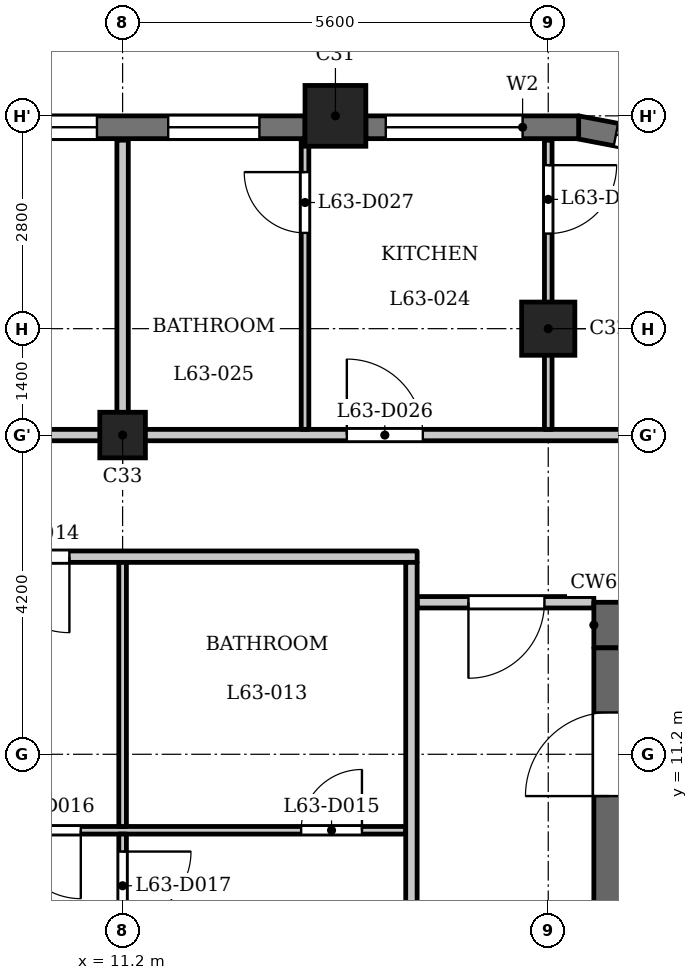
"""IFC4 building model, lengths in metres.
Left out: names, types, materials, properties, quantities, classifications, styles, units other than length and angle.
Written with IfcOpenShell. Run it as: python <this file> out.ifc"""

import sys

from ifc_helpers import new_model, si_unit, direction, frame, frame_2d, origin, origin_2d, place, context, subcontext, project, spatial, rectangle, extrude, element, fill, save


model = new_model("IFC4")
c1 = context("Model", 3, precision=1e-05, world=origin(), true_north=direction((0.0, 1.0)))
c2 = subcontext(c1, "Body", "Model", "MODEL_VIEW")
j1 = project(units=[si_unit("LENGTHUNIT", "METRE"), si_unit("PLANEANGLEUNIT", "RADIAN")], contexts=[c1])
p1 = place(None, origin())
s1 = spatial("IfcSite", under=j1, at=p1, CompositionType="ELEMENT")
p2 = place(p1, origin())
s2 = spatial("IfcBuilding", under=s1, at=p2, CompositionType="ELEMENT")
p3 = place(p2, frame((0.0, 0.0, 245.2)))
s3 = spatial("IfcBuildingStorey", under=s2, at=p3, CompositionType="ELEMENT", Elevation=245.2)
p4 = place(p3, frame((14.0, 19.6, 0.0), z_axis=(0.0, 0.0, 1.0), x_axis=(1.0, 0.0, 0.0)))
e1 = element("IfcColumn", 1, at=p4, inside=s3, PredefinedType="COLUMN", context=c2, shape_type="SweptSolid", body=[
    extrude(rectangle(XDim=0.8, YDim=0.8, at=origin_2d()), origin(), (0.0, 0.0, 1.0), 3.5),
])
p5 = place(p3, frame((16.8, 16.8, 0.0), z_axis=(0.0, 0.0, 1.0), x_axis=(1.0, 0.0, 0.0)))
e2 = element("IfcColumn", 2, at=p5, inside=s3, PredefinedType="COLUMN", context=c2, shape_type="SweptSolid", body=[
    extrude(rectangle(XDim=0.7, YDim=0.7, at=origin_2d()), origin(), (0.0, 0.0, 1.0), 3.5),
])
p6 = place(p3, frame((11.2, 15.4, 0.0), z_axis=(0.0, 0.0, 1.0), x_axis=(1.0, 0.0, 0.0)))
e3 = element("IfcColumn", 3, at=p6, inside=s3, PredefinedType="COLUMN", context=c2, shape_type="SweptSolid", body=[
    extrude(rectangle(XDim=0.6, YDim=0.6, at=origin_2d()), origin(), (0.0, 0.0, 1.0), 3.5),
])
p7 = place(p3, frame((18.995, 19.105, 0.0), z_axis=(0.0, 0.0, 1.0), x_axis=(-0.982301706131, 0.187305520826, 0.0)))
e4 = element("IfcWall", 4, at=p7, inside=s3, PredefinedType="SOLIDWALL", context=c2, shape_type="SweptSolid", body=[
    extrude(rectangle(XDim=1.856, YDim=0.3, at=frame_2d((0.928, 0.0))), origin(), (0.0, 0.0, 1.0), 2.55),
])
p8 = place(p7, frame((0.528, 0.0, 0.6)))
e5 = element("IfcOpeningElement", 5, at=p8, cuts=e4, PredefinedType="OPENING", context=c2, shape_type="SweptSolid", body=[
    extrude(rectangle(XDim=0.8, YDim=1.55, at=frame_2d((0.4, 0.775))), frame((0.0, 0.16, 0.0), z_axis=(0.0, -1.0, 0.0), x_axis=(1.0, 0.0, 0.0)), (0.0, 0.0, 1.0), 0.32),
])
p9 = place(p3, frame((17.2, 19.45, 0.0), z_axis=(0.0, 0.0, 1.0), x_axis=(-1.0, 0.0, 0.0)))
e6 = element("IfcWall", 6, at=p9, inside=s3, PredefinedType="SOLIDWALL", context=c2, shape_type="SweptSolid", body=[
    extrude(rectangle(XDim=2.8, YDim=0.3, at=frame_2d((1.4, 0.0))), origin(), (0.0, 0.0, 1.0), 2.55),
])
p10 = place(p9, frame((0.738, 0.0, 0.9)))
e7 = element("IfcOpeningElement", 7, at=p10, cuts=e6, PredefinedType="OPENING", context=c2, shape_type="SweptSolid", body=[
    extrude(rectangle(XDim=1.8, YDim=1.25, at=frame_2d((0.9, 0.625))), frame((0.0, 0.16, 0.0), z_axis=(0.0, -1.0, 0.0), x_axis=(1.0, 0.0, 0.0)), (0.0, 0.0, 1.0), 0.32),
])
p11 = place(p3, frame((13.6, 19.45, 0.0), z_axis=(0.0, 0.0, 1.0), x_axis=(-1.0, 0.0, 0.0)))
e8 = element("IfcWall", 8, at=p11, inside=s3, PredefinedType="SOLIDWALL", context=c2, shape_type="SweptSolid", body=[
    extrude(rectangle(XDim=4.8, YDim=0.3, at=frame_2d((2.4, 0.0))), origin(), (0.0, 0.0, 1.0), 2.55),
])
p12 = place(p11, frame((0.6, 0.0, 0.6)))
e9 = element("IfcOpeningElement", 9, at=p12, cuts=e8, PredefinedType="OPENING", context=c2, shape_type="SweptSolid", body=[
    extrude(rectangle(XDim=1.2, YDim=1.55, at=frame_2d((0.6, 0.775))), frame((0.0, 0.16, 0.0), z_axis=(0.0, -1.0, 0.0), x_axis=(1.0, 0.0, 0.0)), (0.0, 0.0, 1.0), 0.32),
])
p13 = place(p11, frame((2.738, 0.0, 0.9)))
e10 = element("IfcOpeningElement", 10, at=p13, cuts=e8, PredefinedType="OPENING", context=c2, shape_type="SweptSolid", body=[
    extrude(rectangle(XDim=1.8, YDim=1.25, at=frame_2d((0.9, 0.625))), frame((0.0, 0.16, 0.0), z_axis=(0.0, -1.0, 0.0), x_axis=(1.0, 0.0, 0.0)), (0.0, 0.0, 1.0), 0.32),
])
p14 = place(p3, frame((17.4, 12.9, 0.0), z_axis=(0.0, 0.0, 1.0), x_axis=(1.0, 0.0, 0.0)))
e11 = element("IfcWall", 11, at=p14, inside=s3, PredefinedType="SHEAR", context=c2, shape_type="SweptSolid", body=[
    extrude(rectangle(XDim=7.32, YDim=0.6, at=frame_2d((3.66, 0.0))), origin(), (0.0, 0.0, 1.0), 3.2),
])
p15 = place(p3, frame((17.6, -12.6, 0.0), z_axis=(0.0, 0.0, 1.0), x_axis=(0.0, 1.0, 0.0)))
e12 = element("IfcWall", 12, at=p15, inside=s3, PredefinedType="SHEAR", context=c2, shape_type="SweptSolid", body=[
    extrude(rectangle(XDim=25.2, YDim=0.4, at=frame_2d((12.6, 0.0))), origin(), (0.0, 0.0, 1.0), 3.2),
])
p16 = place(p15, frame((6.3, 0.0, 0.0)))
e13 = element("IfcOpeningElement", 13, at=p16, cuts=e12, PredefinedType="OPENING", context=c2, shape_type="SweptSolid", body=[
    extrude(rectangle(XDim=1.1, YDim=2.1, at=frame_2d((0.55, 1.05))), frame((0.0, 0.21, 0.0), z_axis=(0.0, -1.0, 0.0), x_axis=(1.0, 0.0, 0.0)), (0.0, 0.0, 1.0), 0.42),
])
p17 = place(p15, frame((8.7, 0.0, 0.0)))
e14 = element("IfcOpeningElement", 14, at=p17, cuts=e12, PredefinedType="OPENING", context=c2, shape_type="SweptSolid", body=[
    extrude(rectangle(XDim=1.1, YDim=2.1, at=frame_2d((0.55, 1.05))), frame((0.0, 0.21, 0.0), z_axis=(0.0, -1.0, 0.0), x_axis=(1.0, 0.0, 0.0)), (0.0, 0.0, 1.0), 0.42),
])
p18 = place(p15, frame((11.2, 0.0, 0.0)))
e15 = element("IfcOpeningElement", 15, at=p18, cuts=e12, PredefinedType="OPENING", context=c2, shape_type="SweptSolid", body=[
    extrude(rectangle(XDim=0.9, YDim=2.1, at=frame_2d((0.45, 1.05))), frame((0.0, 0.21, 0.0), z_axis=(0.0, -1.0, 0.0), x_axis=(1.0, 0.0, 0.0)), (0.0, 0.0, 1.0), 0.42),
])
p19 = place(p15, frame((23.25, 0.0, 0.0)))
e16 = element("IfcOpeningElement", 16, at=p19, cuts=e12, PredefinedType="OPENING", context=c2, shape_type="SweptSolid", body=[
    extrude(rectangle(XDim=1.1, YDim=2.1, at=frame_2d((0.55, 1.05))), frame((0.0, 0.21, 0.0), z_axis=(0.0, -1.0, 0.0), x_axis=(1.0, 0.0, 0.0)), (0.0, 0.0, 1.0), 0.42),
])
p20 = place(p15, frame((0.85, 0.0, 0.0)))
e17 = element("IfcOpeningElement", 17, at=p20, cuts=e12, PredefinedType="OPENING", context=c2, shape_type="SweptSolid", body=[
    extrude(rectangle(XDim=1.1, YDim=2.1, at=frame_2d((0.55, 1.05))), frame((0.0, 0.21, 0.0), z_axis=(0.0, -1.0, 0.0), x_axis=(1.0, 0.0, 0.0)), (0.0, 0.0, 1.0), 0.42),
])
p21 = place(p15, frame((13.075, 0.0, 0.0)))
e18 = element("IfcOpeningElement", 18, at=p21, cuts=e12, PredefinedType="OPENING", context=c2, shape_type="SweptSolid", body=[
    extrude(rectangle(XDim=1.8, YDim=2.1, at=frame_2d((0.9, 1.05))), frame((0.0, 0.21, 0.0), z_axis=(0.0, -1.0, 0.0), x_axis=(1.0, 0.0, 0.0)), (0.0, 0.0, 1.0), 0.42),
])
p22 = place(p3, frame((-14.925, 10.2, 0.0), z_axis=(0.0, 0.0, 1.0), x_axis=(1.0, 0.0, 0.0)))
e19 = element("IfcWall", 19, at=p22, inside=s3, PredefinedType="PARTITIONING", context=c2, shape_type="SweptSolid", body=[
    extrude(rectangle(XDim=29.85, YDim=0.1, at=frame_2d((14.925, 0.0))), origin(), (0.0, 0.0, 1.0), 3.2),
])
p23 = place(p22, frame((13.475, 0.0, 0.0)))
e20 = element("IfcOpeningElement", 20, at=p23, cuts=e19, PredefinedType="OPENING", context=c2, shape_type="SweptSolid", body=[
    extrude(rectangle(XDim=0.9, YDim=2.1, at=frame_2d((0.45, 1.05))), frame((0.0, 0.06, 0.0), z_axis=(0.0, -1.0, 0.0), x_axis=(1.0, 0.0, 0.0)), (0.0, 0.0, 1.0), 0.12),
])
p24 = place(p22, frame((4.375, 0.0, 0.0)))
e21 = element("IfcOpeningElement", 21, at=p24, cuts=e19, PredefinedType="OPENING", context=c2, shape_type="SweptSolid", body=[
    extrude(rectangle(XDim=0.9, YDim=2.1, at=frame_2d((0.45, 1.05))), frame((0.0, 0.06, 0.0), z_axis=(0.0, -1.0, 0.0), x_axis=(1.0, 0.0, 0.0)), (0.0, 0.0, 1.0), 0.12),
])
p25 = place(p22, frame((15.475, 0.0, 0.0)))
e22 = element("IfcOpeningElement", 22, at=p25, cuts=e19, PredefinedType="OPENING", context=c2, shape_type="SweptSolid", body=[
    extrude(rectangle(XDim=0.8, YDim=2.1, at=frame_2d((0.4, 1.05))), frame((0.0, 0.06, 0.0), z_axis=(0.0, -1.0, 0.0), x_axis=(1.0, 0.0, 0.0)), (0.0, 0.0, 1.0), 0.12),
])
p26 = place(p22, frame((18.825, 0.0, 0.0)))
e23 = element("IfcOpeningElement", 23, at=p26, cuts=e19, PredefinedType="OPENING", context=c2, shape_type="SweptSolid", body=[
    extrude(rectangle(XDim=0.9, YDim=2.1, at=frame_2d((0.45, 1.05))), frame((0.0, 0.06, 0.0), z_axis=(0.0, -1.0, 0.0), x_axis=(1.0, 0.0, 0.0)), (0.0, 0.0, 1.0), 0.12),
])
p27 = place(p22, frame((28.474, 0.0, 0.0)))
e24 = element("IfcOpeningElement", 24, at=p27, cuts=e19, PredefinedType="OPENING", context=c2, shape_type="SweptSolid", body=[
    extrude(rectangle(XDim=0.8, YDim=2.1, at=frame_2d((0.4, 1.05))), frame((0.0, 0.06, 0.0), z_axis=(0.0, -1.0, 0.0), x_axis=(1.0, 0.0, 0.0)), (0.0, 0.0, 1.0), 0.12),
])
p28 = place(p22, frame((24.675, 0.0, 0.0)))
e25 = element("IfcOpeningElement", 25, at=p28, cuts=e19, PredefinedType="OPENING", context=c2, shape_type="SweptSolid", body=[
    extrude(rectangle(XDim=0.9, YDim=2.1, at=frame_2d((0.45, 1.05))), frame((0.0, 0.06, 0.0), z_axis=(0.0, -1.0, 0.0), x_axis=(1.0, 0.0, 0.0)), (0.0, 0.0, 1.0), 0.12),
])
p29 = place(p3, frame((15.075, 13.2, 0.0), z_axis=(0.0, 0.0, 1.0), x_axis=(1.0, 0.0, 0.0)))
e26 = element("IfcWall", 26, at=p29, inside=s3, PredefinedType="PARTITIONING", context=c2, shape_type="SweptSolid", body=[
    extrude(rectangle(XDim=2.325, YDim=0.15, at=frame_2d((1.163, 0.0))), origin(), (0.0, 0.0, 1.0), 3.2),
])
p30 = place(p29, frame((0.675, 0.0, 0.0)))
e27 = element("IfcOpeningElement", 27, at=p30, cuts=e26, PredefinedType="OPENING", context=c2, shape_type="SweptSolid", body=[
    extrude(rectangle(XDim=1.0, YDim=2.1, at=frame_2d((0.5, 1.05))), frame((0.0, 0.085, 0.0), z_axis=(0.0, -1.0, 0.0), x_axis=(1.0, 0.0, 0.0)), (0.0, 0.0, 1.0), 0.17),
])
p31 = place(p3, frame((-15.075, 13.8, 0.0), z_axis=(0.0, 0.0, 1.0), x_axis=(1.0, 0.0, 0.0)))
e28 = element("IfcWall", 28, at=p31, inside=s3, PredefinedType="PARTITIONING", context=c2, shape_type="SweptSolid", body=[
    extrude(rectangle(XDim=30.15, YDim=0.15, at=frame_2d((15.075, 0.0))), origin(), (0.0, 0.0, 1.0), 3.2),
])
p32 = place(p31, frame((10.125, 0.0, 0.0)))
e29 = element("IfcOpeningElement", 29, at=p32, cuts=e28, PredefinedType="OPENING", context=c2, shape_type="SweptSolid", body=[
    extrude(rectangle(XDim=1.0, YDim=2.1, at=frame_2d((0.5, 1.05))), frame((0.0, 0.085, 0.0), z_axis=(0.0, -1.0, 0.0), x_axis=(1.0, 0.0, 0.0)), (0.0, 0.0, 1.0), 0.17),
])
p33 = place(p31, frame((18.975, 0.0, 0.0)))
e30 = element("IfcOpeningElement", 30, at=p33, cuts=e28, PredefinedType="OPENING", context=c2, shape_type="SweptSolid", body=[
    extrude(rectangle(XDim=1.0, YDim=2.1, at=frame_2d((0.5, 1.05))), frame((0.0, 0.085, 0.0), z_axis=(0.0, -1.0, 0.0), x_axis=(1.0, 0.0, 0.0)), (0.0, 0.0, 1.0), 0.17),
])
p34 = place(p31, frame((24.575, 0.0, 0.0)))
e31 = element("IfcOpeningElement", 31, at=p34, cuts=e28, PredefinedType="OPENING", context=c2, shape_type="SweptSolid", body=[
    extrude(rectangle(XDim=1.0, YDim=2.1, at=frame_2d((0.5, 1.05))), frame((0.0, 0.085, 0.0), z_axis=(0.0, -1.0, 0.0), x_axis=(1.0, 0.0, 0.0)), (0.0, 0.0, 1.0), 0.17),
])
p35 = place(p3, frame((-23.55, 15.4, 0.0), z_axis=(0.0, 0.0, 1.0), x_axis=(1.0, 0.0, 0.0)))
e32 = element("IfcWall", 32, at=p35, inside=s3, PredefinedType="PARTITIONING", context=c2, shape_type="SweptSolid", body=[
    extrude(rectangle(XDim=46.872, YDim=0.15, at=frame_2d((23.436, 0.0))), origin(), (0.0, 0.0, 1.0), 3.2),
])
p36 = place(p35, frame((12.9, 0.0, 0.0)))
e33 = element("IfcOpeningElement", 33, at=p36, cuts=e32, PredefinedType="OPENING", context=c2, shape_type="SweptSolid", body=[
    extrude(rectangle(XDim=1.0, YDim=2.1, at=frame_2d((0.5, 1.05))), frame((0.0, 0.085, 0.0), z_axis=(0.0, -1.0, 0.0), x_axis=(1.0, 0.0, 0.0)), (0.0, 0.0, 1.0), 0.17),
])
p37 = place(p35, frame((20.9, 0.0, 0.0)))
e34 = element("IfcOpeningElement", 34, at=p37, cuts=e32, PredefinedType="OPENING", context=c2, shape_type="SweptSolid", body=[
    extrude(rectangle(XDim=1.0, YDim=2.1, at=frame_2d((0.5, 1.05))), frame((0.0, 0.085, 0.0), z_axis=(0.0, -1.0, 0.0), x_axis=(1.0, 0.0, 0.0)), (0.0, 0.0, 1.0), 0.17),
])
p38 = place(p35, frame((37.7, 0.0, 0.0)))
e35 = element("IfcOpeningElement", 35, at=p38, cuts=e32, PredefinedType="OPENING", context=c2, shape_type="SweptSolid", body=[
    extrude(rectangle(XDim=1.0, YDim=2.1, at=frame_2d((0.5, 1.05))), frame((0.0, 0.085, 0.0), z_axis=(0.0, -1.0, 0.0), x_axis=(1.0, 0.0, 0.0)), (0.0, 0.0, 1.0), 0.17),
])
p39 = place(p3, frame((11.2, 7.32, 0.0), z_axis=(0.0, 0.0, 1.0), x_axis=(0.0, 1.0, 0.0)))
e36 = element("IfcWall", 36, at=p39, inside=s3, PredefinedType="PARTITIONING", context=c2, shape_type="SweptSolid", body=[
    extrude(rectangle(XDim=2.83, YDim=0.1, at=frame_2d((1.415, 0.0))), origin(), (0.0, 0.0, 1.0), 3.2),
])
p40 = place(p39, frame((1.7, 0.0, 0.0)))
e37 = element("IfcOpeningElement", 37, at=p40, cuts=e36, PredefinedType="OPENING", context=c2, shape_type="SweptSolid", body=[
    extrude(rectangle(XDim=0.9, YDim=2.1, at=frame_2d((0.45, 1.05))), frame((0.0, 0.06, 0.0), z_axis=(0.0, -1.0, 0.0), x_axis=(1.0, 0.0, 0.0)), (0.0, 0.0, 1.0), 0.12),
])
p41 = place(p3, frame((11.2, 10.25, 0.0), z_axis=(0.0, 0.0, 1.0), x_axis=(0.0, 1.0, 0.0)))
e38 = element("IfcWall", 38, at=p41, inside=s3, PredefinedType="PARTITIONING", context=c2, shape_type="SweptSolid", body=[
    extrude(rectangle(XDim=3.475, YDim=0.1, at=frame_2d((1.738, 0.0))), origin(), (0.0, 0.0, 1.0), 3.2),
])
p42 = place(p3, frame((11.2, 15.475, 0.0), z_axis=(0.0, 0.0, 1.0), x_axis=(0.0, 1.0, 0.0)))
e39 = element("IfcWall", 39, at=p42, inside=s3, PredefinedType="PARTITIONING", context=c2, shape_type="SweptSolid", body=[
    extrude(rectangle(XDim=3.805, YDim=0.15, at=frame_2d((1.902, 0.0))), origin(), (0.0, 0.0, 1.0), 3.2),
])
p43 = place(p3, frame((13.6, 15.475, 0.0), z_axis=(0.0, 0.0, 1.0), x_axis=(0.0, 1.0, 0.0)))
e40 = element("IfcWall", 40, at=p43, inside=s3, PredefinedType="PARTITIONING", context=c2, shape_type="SweptSolid", body=[
    extrude(rectangle(XDim=3.805, YDim=0.1, at=frame_2d((1.902, 0.0))), origin(), (0.0, 0.0, 1.0), 3.2),
])
p44 = place(p43, frame((2.585, 0.0, 0.0)))
e41 = element("IfcOpeningElement", 41, at=p44, cuts=e40, PredefinedType="OPENING", context=c2, shape_type="SweptSolid", body=[
    extrude(rectangle(XDim=0.8, YDim=2.1, at=frame_2d((0.4, 1.05))), frame((0.0, 0.06, 0.0), z_axis=(0.0, -1.0, 0.0), x_axis=(1.0, 0.0, 0.0)), (0.0, 0.0, 1.0), 0.12),
])
p45 = place(p3, frame((15.0, 6.769, 0.0), z_axis=(0.0, 0.0, 1.0), x_axis=(0.0, 1.0, 0.0)))
e42 = element("IfcWall", 42, at=p45, inside=s3, PredefinedType="PARTITIONING", context=c2, shape_type="SweptSolid", body=[
    extrude(rectangle(XDim=6.956, YDim=0.15, at=frame_2d((3.478, 0.0))), origin(), (0.0, 0.0, 1.0), 3.2),
])
p46 = place(p3, frame((16.8, 15.475, 0.0), z_axis=(0.0, 0.0, 1.0), x_axis=(0.0, 1.0, 0.0)))
e43 = element("IfcWall", 43, at=p46, inside=s3, PredefinedType="PARTITIONING", context=c2, shape_type="SweptSolid", body=[
    extrude(rectangle(XDim=3.805, YDim=0.1, at=frame_2d((1.902, 0.0))), origin(), (0.0, 0.0, 1.0), 3.2),
])
p47 = place(p46, frame((2.576, 0.0, 0.0)))
e44 = element("IfcOpeningElement", 44, at=p47, cuts=e43, PredefinedType="OPENING", context=c2, shape_type="SweptSolid", body=[
    extrude(rectangle(XDim=0.9, YDim=2.1, at=frame_2d((0.45, 1.05))), frame((0.0, 0.06, 0.0), z_axis=(0.0, -1.0, 0.0), x_axis=(1.0, 0.0, 0.0)), (0.0, 0.0, 1.0), 0.12),
])
p48 = place(p19, origin())
e45 = element("IfcDoor", 45, at=p48, inside=s3, OperationType="SINGLE_SWING_RIGHT", PredefinedType="DOOR", context=c2, shape_type="SweptSolid", body=[
    extrude(rectangle(XDim=1.1, YDim=2.1, at=frame_2d((0.55, 1.05))), frame((0.0, 0.025, 0.0), z_axis=(0.0, -1.0, 0.0), x_axis=(1.0, 0.0, 0.0)), (0.0, 0.0, 1.0), 0.05),
])
fill(e16, e45)
p49 = place(p30, origin())
e46 = element("IfcDoor", 46, at=p49, inside=s3, OperationType="SINGLE_SWING_LEFT", PredefinedType="DOOR", context=c2, shape_type="SweptSolid", body=[
    extrude(rectangle(XDim=1.0, YDim=2.1, at=frame_2d((0.5, 1.05))), frame((0.0, 0.025, 0.0), z_axis=(0.0, -1.0, 0.0), x_axis=(1.0, 0.0, 0.0)), (0.0, 0.0, 1.0), 0.05),
])
fill(e27, e46)
p50 = place(p34, origin())
e47 = element("IfcDoor", 47, at=p50, inside=s3, OperationType="SINGLE_SWING_RIGHT", PredefinedType="DOOR", context=c2, shape_type="SweptSolid", body=[
    extrude(rectangle(XDim=1.0, YDim=2.1, at=frame_2d((0.5, 1.05))), frame((0.0, 0.025, 0.0), z_axis=(0.0, -1.0, 0.0), x_axis=(1.0, 0.0, 0.0)), (0.0, 0.0, 1.0), 0.05),
])
fill(e31, e47)
p51 = place(p27, origin())
e48 = element("IfcDoor", 48, at=p51, inside=s3, OperationType="SINGLE_SWING_LEFT", PredefinedType="DOOR", context=c2, shape_type="SweptSolid", body=[
    extrude(rectangle(XDim=0.8, YDim=2.1, at=frame_2d((0.4, 1.05))), frame((0.0, 0.025, 0.0), z_axis=(0.0, -1.0, 0.0), x_axis=(1.0, 0.0, 0.0)), (0.0, 0.0, 1.0), 0.05),
])
fill(e24, e48)
p52 = place(p28, origin())
e49 = element("IfcDoor", 49, at=p52, inside=s3, OperationType="SINGLE_SWING_RIGHT", PredefinedType="DOOR", context=c2, shape_type="SweptSolid", body=[
    extrude(rectangle(XDim=0.9, YDim=2.1, at=frame_2d((0.45, 1.05))), frame((0.0, 0.025, 0.0), z_axis=(0.0, -1.0, 0.0), x_axis=(1.0, 0.0, 0.0)), (0.0, 0.0, 1.0), 0.05),
])
fill(e25, e49)
p53 = place(p40, origin())
e50 = element("IfcDoor", 50, at=p53, inside=s3, OperationType="SINGLE_SWING_RIGHT", PredefinedType="DOOR", context=c2, shape_type="SweptSolid", body=[
    extrude(rectangle(XDim=0.9, YDim=2.1, at=frame_2d((0.45, 1.05))), frame((0.0, 0.025, 0.0), z_axis=(0.0, -1.0, 0.0), x_axis=(1.0, 0.0, 0.0)), (0.0, 0.0, 1.0), 0.05),
])
fill(e37, e50)
p54 = place(p38, origin())
e51 = element("IfcDoor", 51, at=p54, inside=s3, OperationType="SINGLE_SWING_RIGHT", PredefinedType="DOOR", context=c2, shape_type="SweptSolid", body=[
    extrude(rectangle(XDim=1.0, YDim=2.1, at=frame_2d((0.5, 1.05))), frame((0.0, 0.025, 0.0), z_axis=(0.0, -1.0, 0.0), x_axis=(1.0, 0.0, 0.0)), (0.0, 0.0, 1.0), 0.05),
])
fill(e35, e51)
p55 = place(p44, origin())
e52 = element("IfcDoor", 52, at=p55, inside=s3, OperationType="SINGLE_SWING_LEFT", PredefinedType="DOOR", context=c2, shape_type="SweptSolid", body=[
    extrude(rectangle(XDim=0.8, YDim=2.1, at=frame_2d((0.4, 1.05))), frame((0.0, 0.025, 0.0), z_axis=(0.0, -1.0, 0.0), x_axis=(1.0, 0.0, 0.0)), (0.0, 0.0, 1.0), 0.05),
])
fill(e41, e52)
p56 = place(p47, origin())
e53 = element("IfcDoor", 53, at=p56, inside=s3, OperationType="SINGLE_SWING_RIGHT", PredefinedType="DOOR", context=c2, shape_type="SweptSolid", body=[
    extrude(rectangle(XDim=0.9, YDim=2.1, at=frame_2d((0.45, 1.05))), frame((0.0, 0.025, 0.0), z_axis=(0.0, -1.0, 0.0), x_axis=(1.0, 0.0, 0.0)), (0.0, 0.0, 1.0), 0.05),
])
fill(e44, e53)
p57 = place(p8, origin())
e54 = element("IfcWindow", 54, at=p57, inside=s3, PartitioningType="SINGLE_PANEL", PredefinedType="WINDOW", context=c2, shape_type="SweptSolid", body=[
    extrude(rectangle(XDim=0.8, YDim=1.55, at=frame_2d((0.4, 0.775))), frame((0.0, 0.03, 0.0), z_axis=(0.0, -1.0, 0.0), x_axis=(1.0, 0.0, 0.0)), (0.0, 0.0, 1.0), 0.06),
])
fill(e5, e54)
p58 = place(p10, origin())
e55 = element("IfcWindow", 55, at=p58, inside=s3, PartitioningType="SINGLE_PANEL", PredefinedType="WINDOW", context=c2, shape_type="SweptSolid", body=[
    extrude(rectangle(XDim=1.8, YDim=1.25, at=frame_2d((0.9, 0.625))), frame((0.0, 0.03, 0.0), z_axis=(0.0, -1.0, 0.0), x_axis=(1.0, 0.0, 0.0)), (0.0, 0.0, 1.0), 0.06),
])
fill(e7, e55)
p59 = place(p12, origin())
e56 = element("IfcWindow", 56, at=p59, inside=s3, PartitioningType="SINGLE_PANEL", PredefinedType="WINDOW", context=c2, shape_type="SweptSolid", body=[
    extrude(rectangle(XDim=1.2, YDim=1.55, at=frame_2d((0.6, 0.775))), frame((0.0, 0.03, 0.0), z_axis=(0.0, -1.0, 0.0), x_axis=(1.0, 0.0, 0.0)), (0.0, 0.0, 1.0), 0.06),
])
fill(e9, e56)
p60 = place(p13, origin())
e57 = element("IfcWindow", 57, at=p60, inside=s3, PartitioningType="SINGLE_PANEL", PredefinedType="WINDOW", context=c2, shape_type="SweptSolid", body=[
    extrude(rectangle(XDim=1.8, YDim=1.25, at=frame_2d((0.9, 0.625))), frame((0.0, 0.03, 0.0), z_axis=(0.0, -1.0, 0.0), x_axis=(1.0, 0.0, 0.0)), (0.0, 0.0, 1.0), 0.06),
])
fill(e10, e57)
save(model, sys.argv[1])
